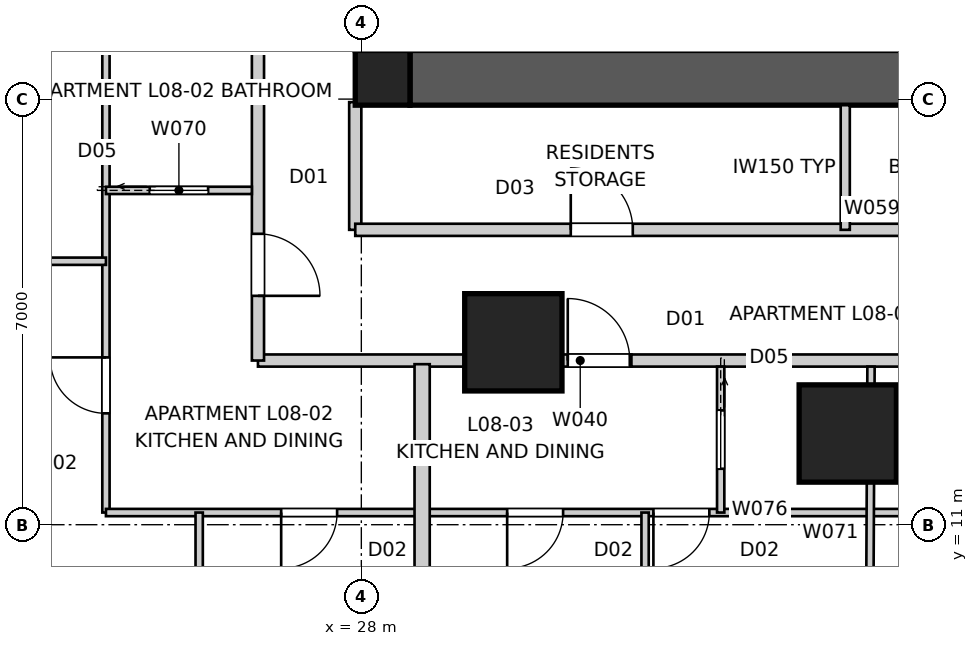
"""IFC4 building model, lengths in metres.
Left out: names, types, materials, properties, quantities, classifications, styles, units other than length and angle.
Written with IfcOpenShell. Run it as: python <this file> out.ifc"""

import sys

from ifc_helpers import new_model, si_unit, direction, frame, frame_2d, origin, origin_2d, place, context, subcontext, project, spatial, polyline, rectangle, outline, extrude, element, fill, save


model = new_model("IFC4")
c1 = context("Model", 3, precision=1e-05, world=origin(), true_north=direction((0.0, 1.0)))
c2 = subcontext(c1, "Body", "Model", "MODEL_VIEW")
j1 = project(units=[si_unit("LENGTHUNIT", "METRE"), si_unit("PLANEANGLEUNIT", "RADIAN")], contexts=[c1])
p1 = place(None, origin())
s1 = spatial("IfcSite", under=j1, at=p1, CompositionType="ELEMENT")
p2 = place(p1, origin())
s2 = spatial("IfcBuilding", under=s1, at=p2, CompositionType="ELEMENT")
p3 = place(p2, frame((0.0, 0.0, 32.0)))
s3 = spatial("IfcBuildingStorey", under=s2, at=p3, CompositionType="ELEMENT", Elevation=32.0)
p4 = place(p3, frame((51.2, 18.35, 0.0), z_axis=(0.0, 0.0, 1.0), x_axis=(-1.0, 0.0, 0.0)))
e1 = element("IfcWall", 1, at=p4, inside=s3, PredefinedType="SHEAR", context=c2, shape_type="SweptSolid", body=[
    extrude(outline(polyline([(0.0, -0.45), (22.4, -0.45), (22.4, -0.025), (22.85, -0.025), (22.85, 0.025), (22.4, 0.025), (22.4, 0.45), (0.0, 0.45), (0.0, 0.025), (-0.45, 0.025), (-0.45, -0.025), (0.0, -0.025), (0.0, -0.45)])), origin(), (0.0, 0.0, 1.0), 3.4),
])
p5 = place(p3, frame((28.35, 41.2, 0.0), z_axis=(0.0, 0.0, 1.0), x_axis=(0.0, -1.0, 0.0)))
e2 = element("IfcWall", 2, at=p5, inside=s3, PredefinedType="SHEAR", context=c2, shape_type="SweptSolid", body=[
    extrude(outline(polyline([(0.0, -0.45), (22.4, -0.45), (22.4, -0.025), (22.85, -0.025), (22.85, 0.025), (22.4, 0.025), (22.4, 0.45), (0.0, 0.45), (0.0, 0.025), (-0.45, 0.025), (-0.45, -0.025), (0.0, -0.025), (0.0, -0.45)])), origin(), (0.0, 0.0, 1.0), 3.4),
])
p6 = place(p5, frame((11.14, 0.0, 0.0)))
e3 = element("IfcOpeningElement", 3, at=p6, cuts=e2, PredefinedType="OPENING", context=c2, shape_type="SweptSolid", body=[
    extrude(rectangle(XDim=1.02, YDim=2.4, at=frame_2d((0.51, 1.2))), frame((0.0, 0.46, 0.0), z_axis=(0.0, -1.0, 0.0), x_axis=(1.0, 0.0, 0.0)), (0.0, 0.0, 1.0), 0.92),
])
p7 = place(p3, frame((28.35, 18.35, 0.0), z_axis=(0.0, 0.0, 1.0), x_axis=(1.0, 0.0, 0.0)))
e4 = element("IfcColumn", 4, at=p7, inside=s3, PredefinedType="COLUMN", context=c2, shape_type="SweptSolid", body=[
    extrude(rectangle(XDim=0.9, YDim=0.9, at=origin_2d()), origin(), (0.0, 0.0, 1.0), 3.4),
])
for number, where, z_axis, x_axis in (
    (5, (30.5, 14.0, 0.0), (0.0, 0.0, 1.0), (1.0, 0.0, 0.0)),
    (6, (36.0, 12.5, 0.0), (0.0, 0.0, 1.0), (1.0, 0.0, 0.0)),
):
    element("IfcColumn", number, at=place(p3, frame(where, z_axis=z_axis, x_axis=x_axis)), inside=s3, PredefinedType="COLUMN", context=c2, shape_type="SweptSolid", body=[
        extrude(rectangle(XDim=1.6, YDim=1.6, at=origin_2d()), origin(), (0.0, 0.0, 1.0), 3.4),
    ])
p8 = place(p3, frame((26.3, 13.7, 0.0), z_axis=(0.0, 0.0, 1.0), x_axis=(1.0, 0.0, 0.0)))
e7 = element("IfcWall", 7, at=p8, inside=s3, PredefinedType="PARTITIONING", context=c2, shape_type="SweptSolid", body=[
    extrude(rectangle(XDim=4.458, YDim=0.2, at=frame_2d((2.229, 0.0))), origin(), (0.0, 0.0, 1.0), 3.25),
])
p9 = place(p3, frame((30.758, 13.7, 0.0), z_axis=(0.0, 0.0, 1.0), x_axis=(1.0, 0.0, 0.0)))
e8 = element("IfcWall", 8, at=p9, inside=s3, PredefinedType="PARTITIONING", context=c2, shape_type="SweptSolid", body=[
    extrude(rectangle(XDim=1.683, YDim=0.2, at=frame_2d((0.842, 0.0))), origin(), (0.0, 0.0, 1.0), 2.55),
])
p10 = place(p9, frame((0.637, 0.0, 0.0)))
e9 = element("IfcOpeningElement", 9, at=p10, cuts=e8, PredefinedType="OPENING", context=c2, shape_type="SweptSolid", body=[
    extrude(rectangle(XDim=1.02, YDim=2.34, at=frame_2d((0.51, 1.17))), frame((0.0, 0.11, 0.0), z_axis=(0.0, -1.0, 0.0), x_axis=(1.0, 0.0, 0.0)), (0.0, 0.0, 1.0), 0.22),
])
p11 = place(p3, frame((32.442, 13.7, 0.0), z_axis=(0.0, 0.0, 1.0), x_axis=(1.0, 0.0, 0.0)))
e10 = element("IfcWall", 10, at=p11, inside=s3, PredefinedType="PARTITIONING", context=c2, shape_type="SweptSolid", body=[
    extrude(rectangle(XDim=15.117, YDim=0.2, at=frame_2d((7.558, 0.0))), origin(), (0.0, 0.0, 1.0), 3.25),
])
p12 = place(p3, frame((26.3, 46.3, 0.0), z_axis=(0.0, 0.0, 1.0), x_axis=(0.0, -1.0, 0.0)))
e11 = element("IfcWall", 11, at=p12, inside=s3, PredefinedType="PARTITIONING", context=c2, shape_type="SweptSolid", body=[
    extrude(rectangle(XDim=32.6, YDim=0.2, at=frame_2d((16.3, 0.0))), origin(), (0.0, 0.0, 1.0), 3.25),
])
p13 = place(p12, frame((2.315, 0.0, 0.0)))
e12 = element("IfcOpeningElement", 12, at=p13, cuts=e11, PredefinedType="OPENING", context=c2, shape_type="SweptSolid", body=[
    extrude(rectangle(XDim=1.02, YDim=2.34, at=frame_2d((0.51, 1.17))), frame((0.0, 0.11, 0.0), z_axis=(0.0, -1.0, 0.0), x_axis=(1.0, 0.0, 0.0)), (0.0, 0.0, 1.0), 0.22),
])
p14 = place(p12, frame((10.624, 0.0, 0.0)))
e13 = element("IfcOpeningElement", 13, at=p14, cuts=e11, PredefinedType="OPENING", context=c2, shape_type="SweptSolid", body=[
    extrude(rectangle(XDim=1.02, YDim=2.34, at=frame_2d((0.51, 1.17))), frame((0.0, 0.11, 0.0), z_axis=(0.0, -1.0, 0.0), x_axis=(1.0, 0.0, 0.0)), (0.0, 0.0, 1.0), 0.22),
])
p15 = place(p12, frame((17.848, 0.0, 0.0)))
e14 = element("IfcOpeningElement", 14, at=p15, cuts=e11, PredefinedType="OPENING", context=c2, shape_type="SweptSolid", body=[
    extrude(rectangle(XDim=1.02, YDim=2.34, at=frame_2d((0.51, 1.17))), frame((0.0, 0.11, 0.0), z_axis=(0.0, -1.0, 0.0), x_axis=(1.0, 0.0, 0.0)), (0.0, 0.0, 1.0), 0.22),
])
p16 = place(p12, frame((30.516, 0.0, 0.0)))
e15 = element("IfcOpeningElement", 15, at=p16, cuts=e11, PredefinedType="OPENING", context=c2, shape_type="SweptSolid", body=[
    extrude(rectangle(XDim=1.02, YDim=2.34, at=frame_2d((0.51, 1.17))), frame((0.0, 0.11, 0.0), z_axis=(0.0, -1.0, 0.0), x_axis=(1.0, 0.0, 0.0)), (0.0, 0.0, 1.0), 0.22),
])
p17 = place(p3, frame((29.0, 4.0, 0.0), z_axis=(0.0, 0.0, 1.0), x_axis=(0.0, 1.0, 0.0)))
e16 = element("IfcWall", 16, at=p17, inside=s3, PredefinedType="PARTITIONING", context=c2, shape_type="SweptSolid", body=[
    extrude(rectangle(XDim=9.64, YDim=0.25, at=frame_2d((4.82, 0.0))), origin(), (0.0, 0.0, 1.0), 3.25),
])
p18 = place(p3, frame((27.9, 17.95, 0.0), z_axis=(0.0, 0.0, 1.0), x_axis=(0.0, -1.0, 0.0)))
e17 = element("IfcWall", 17, at=p18, inside=s3, PredefinedType="PARTITIONING", context=c2, shape_type="SweptSolid", body=[
    extrude(rectangle(XDim=2.1, YDim=0.2, at=frame_2d((1.05, 0.0))), origin(), (0.0, 0.0, 1.0), 3.25),
])
p19 = place(p3, frame((27.9, 15.85, 0.0), z_axis=(0.0, 0.0, 1.0), x_axis=(1.0, 0.0, 0.0)))
e18 = element("IfcWall", 18, at=p19, inside=s3, PredefinedType="PARTITIONING", context=c2, shape_type="SweptSolid", body=[
    extrude(rectangle(XDim=24.2, YDim=0.2, at=frame_2d((12.1, 0.0))), origin(), (0.0, 0.0, 1.0), 3.25),
])
p20 = place(p19, frame((12.437, 0.0, 0.0)))
e19 = element("IfcOpeningElement", 19, at=p20, cuts=e18, PredefinedType="OPENING", context=c2, shape_type="SweptSolid", body=[
    extrude(rectangle(XDim=1.02, YDim=2.1, at=frame_2d((0.51, 1.05))), frame((0.0, 0.11, 0.0), z_axis=(0.0, -1.0, 0.0), x_axis=(1.0, 0.0, 0.0)), (0.0, 0.0, 1.0), 0.22),
])
p21 = place(p19, frame((3.544, 0.0, 0.0)))
e20 = element("IfcOpeningElement", 20, at=p21, cuts=e18, PredefinedType="OPENING", context=c2, shape_type="SweptSolid", body=[
    extrude(rectangle(XDim=1.02, YDim=2.1, at=frame_2d((0.51, 1.05))), frame((0.0, 0.11, 0.0), z_axis=(0.0, -1.0, 0.0), x_axis=(1.0, 0.0, 0.0)), (0.0, 0.0, 1.0), 0.22),
])
p22 = place(p19, frame((19.733, 0.0, 0.0)))
e21 = element("IfcOpeningElement", 21, at=p22, cuts=e18, PredefinedType="OPENING", context=c2, shape_type="SweptSolid", body=[
    extrude(rectangle(XDim=1.02, YDim=2.1, at=frame_2d((0.51, 1.05))), frame((0.0, 0.11, 0.0), z_axis=(0.0, -1.0, 0.0), x_axis=(1.0, 0.0, 0.0)), (0.0, 0.0, 1.0), 0.22),
])
p23 = place(p3, frame((35.958, 15.85, 0.0), z_axis=(0.0, 0.0, 1.0), x_axis=(0.0, 1.0, 0.0)))
e22 = element("IfcWall", 22, at=p23, inside=s3, PredefinedType="SOLIDWALL", context=c2, shape_type="SweptSolid", body=[
    extrude(rectangle(XDim=2.05, YDim=0.15, at=frame_2d((1.025, 0.0))), origin(), (0.0, 0.0, 1.0), 3.25),
])
p24 = place(p3, frame((23.8, 11.2, 0.0), z_axis=(0.0, 0.0, 1.0), x_axis=(0.0, 1.0, 0.0)))
e23 = element("IfcWall", 23, at=p24, inside=s3, PredefinedType="PARTITIONING", context=c2, shape_type="SweptSolid", body=[
    extrude(rectangle(XDim=37.133, YDim=0.12, at=frame_2d((18.567, 0.0))), origin(), (0.0, 0.0, 1.0), 2.55),
])
p25 = place(p24, frame((33.007, 0.0, 0.0)))
e24 = element("IfcOpeningElement", 24, at=p25, cuts=e23, PredefinedType="OPENING", context=c2, shape_type="SweptSolid", body=[
    extrude(rectangle(XDim=0.92, YDim=2.34, at=frame_2d((0.46, 1.17))), frame((0.0, 0.07, 0.0), z_axis=(0.0, -1.0, 0.0), x_axis=(1.0, 0.0, 0.0)), (0.0, 0.0, 1.0), 0.14),
])
p26 = place(p24, frame((23.84, 0.0, 0.0)))
e25 = element("IfcOpeningElement", 25, at=p26, cuts=e23, PredefinedType="OPENING", context=c2, shape_type="SweptSolid", body=[
    extrude(rectangle(XDim=0.92, YDim=2.34, at=frame_2d((0.46, 1.17))), frame((0.0, 0.07, 0.0), z_axis=(0.0, -1.0, 0.0), x_axis=(1.0, 0.0, 0.0)), (0.0, 0.0, 1.0), 0.14),
])
p27 = place(p24, frame((16.482, 0.0, 0.0)))
e26 = element("IfcOpeningElement", 26, at=p27, cuts=e23, PredefinedType="OPENING", context=c2, shape_type="SweptSolid", body=[
    extrude(rectangle(XDim=0.92, YDim=2.34, at=frame_2d((0.46, 1.17))), frame((0.0, 0.07, 0.0), z_axis=(0.0, -1.0, 0.0), x_axis=(1.0, 0.0, 0.0)), (0.0, 0.0, 1.0), 0.14),
])
p28 = place(p24, frame((1.632, 0.0, 0.0)))
e27 = element("IfcOpeningElement", 27, at=p28, cuts=e23, PredefinedType="OPENING", context=c2, shape_type="SweptSolid", body=[
    extrude(rectangle(XDim=0.92, YDim=2.34, at=frame_2d((0.46, 1.17))), frame((0.0, 0.07, 0.0), z_axis=(0.0, -1.0, 0.0), x_axis=(1.0, 0.0, 0.0)), (0.0, 0.0, 1.0), 0.14),
])
p29 = place(p24, frame((19.704, 0.0, 0.0)))
e28 = element("IfcOpeningElement", 28, at=p29, cuts=e23, PredefinedType="OPENING", context=c2, shape_type="SweptSolid", body=[
    extrude(rectangle(XDim=0.96, YDim=2.1, at=frame_2d((0.48, 1.05))), frame((0.0, 0.07, 0.0), z_axis=(0.0, -1.0, 0.0), x_axis=(1.0, 0.0, 0.0)), (0.0, 0.0, 1.0), 0.14),
])
p30 = place(p24, frame((10.128, 0.0, 0.0)))
e29 = element("IfcOpeningElement", 29, at=p30, cuts=e23, PredefinedType="OPENING", context=c2, shape_type="SweptSolid", body=[
    extrude(rectangle(XDim=0.96, YDim=2.1, at=frame_2d((0.48, 1.05))), frame((0.0, 0.07, 0.0), z_axis=(0.0, -1.0, 0.0), x_axis=(1.0, 0.0, 0.0)), (0.0, 0.0, 1.0), 0.14),
])
p31 = place(p3, frame((23.8, 16.499, 0.0), z_axis=(0.0, 0.0, 1.0), x_axis=(1.0, 0.0, 0.0)))
e30 = element("IfcWall", 30, at=p31, inside=s3, PredefinedType="PARTITIONING", context=c2, shape_type="SweptSolid", body=[
    extrude(rectangle(XDim=2.4, YDim=0.12, at=frame_2d((1.2, 0.0))), origin(), (0.0, 0.0, 1.0), 3.25),
])
p32 = place(p31, frame((0.72, 0.0, 0.0)))
e31 = element("IfcOpeningElement", 31, at=p32, cuts=e30, PredefinedType="OPENING", context=c2, shape_type="SweptSolid", body=[
    extrude(rectangle(XDim=0.96, YDim=2.1, at=frame_2d((0.48, 1.05))), frame((0.0, 0.07, 0.0), z_axis=(0.0, -1.0, 0.0), x_axis=(1.0, 0.0, 0.0)), (0.0, 0.0, 1.0), 0.14),
])
p33 = place(p3, frame((54.667, 11.2, 0.0), z_axis=(0.0, 0.0, 1.0), x_axis=(-1.0, 0.0, 0.0)))
e32 = element("IfcWall", 32, at=p33, inside=s3, PredefinedType="PARTITIONING", context=c2, shape_type="SweptSolid", body=[
    extrude(rectangle(XDim=30.867, YDim=0.12, at=frame_2d((15.433, 0.0))), origin(), (0.0, 0.0, 1.0), 3.25),
])
p34 = place(p33, frame((23.348, 0.0, 0.0)))
e33 = element("IfcOpeningElement", 33, at=p34, cuts=e32, PredefinedType="OPENING", context=c2, shape_type="SweptSolid", body=[
    extrude(rectangle(XDim=0.92, YDim=2.34, at=frame_2d((0.46, 1.17))), frame((0.0, 0.07, 0.0), z_axis=(0.0, -1.0, 0.0), x_axis=(1.0, 0.0, 0.0)), (0.0, 0.0, 1.0), 0.14),
])
p35 = place(p33, frame((20.943, 0.0, 0.0)))
e34 = element("IfcOpeningElement", 34, at=p35, cuts=e32, PredefinedType="OPENING", context=c2, shape_type="SweptSolid", body=[
    extrude(rectangle(XDim=0.92, YDim=2.34, at=frame_2d((0.46, 1.17))), frame((0.0, 0.07, 0.0), z_axis=(0.0, -1.0, 0.0), x_axis=(1.0, 0.0, 0.0)), (0.0, 0.0, 1.0), 0.14),
])
p36 = place(p33, frame((5.065, 0.0, 0.0)))
e35 = element("IfcOpeningElement", 35, at=p36, cuts=e32, PredefinedType="OPENING", context=c2, shape_type="SweptSolid", body=[
    extrude(rectangle(XDim=0.92, YDim=2.34, at=frame_2d((0.46, 1.17))), frame((0.0, 0.07, 0.0), z_axis=(0.0, -1.0, 0.0), x_axis=(1.0, 0.0, 0.0)), (0.0, 0.0, 1.0), 0.14),
])
p37 = place(p33, frame((27.065, 0.0, 0.0)))
e36 = element("IfcOpeningElement", 36, at=p37, cuts=e32, PredefinedType="OPENING", context=c2, shape_type="SweptSolid", body=[
    extrude(rectangle(XDim=0.92, YDim=2.34, at=frame_2d((0.46, 1.17))), frame((0.0, 0.07, 0.0), z_axis=(0.0, -1.0, 0.0), x_axis=(1.0, 0.0, 0.0)), (0.0, 0.0, 1.0), 0.14),
])
p38 = place(p33, frame((1.353, 0.0, 0.0)))
e37 = element("IfcOpeningElement", 37, at=p38, cuts=e32, PredefinedType="OPENING", context=c2, shape_type="SweptSolid", body=[
    extrude(rectangle(XDim=0.96, YDim=2.1, at=frame_2d((0.48, 1.05))), frame((0.0, 0.07, 0.0), z_axis=(0.0, -1.0, 0.0), x_axis=(1.0, 0.0, 0.0)), (0.0, 0.0, 1.0), 0.14),
])
p39 = place(p33, frame((8.83, 0.0, 0.0)))
e38 = element("IfcOpeningElement", 38, at=p39, cuts=e32, PredefinedType="OPENING", context=c2, shape_type="SweptSolid", body=[
    extrude(rectangle(XDim=0.96, YDim=2.1, at=frame_2d((0.48, 1.05))), frame((0.0, 0.07, 0.0), z_axis=(0.0, -1.0, 0.0), x_axis=(1.0, 0.0, 0.0)), (0.0, 0.0, 1.0), 0.14),
])
p40 = place(p33, frame((12.328, 0.0, 0.0)))
e39 = element("IfcOpeningElement", 39, at=p40, cuts=e32, PredefinedType="OPENING", context=c2, shape_type="SweptSolid", body=[
    extrude(rectangle(XDim=0.96, YDim=2.1, at=frame_2d((0.48, 1.05))), frame((0.0, 0.07, 0.0), z_axis=(0.0, -1.0, 0.0), x_axis=(1.0, 0.0, 0.0)), (0.0, 0.0, 1.0), 0.14),
])
p41 = place(p33, frame((15.996, 0.0, 0.0)))
e40 = element("IfcOpeningElement", 40, at=p41, cuts=e32, PredefinedType="OPENING", context=c2, shape_type="SweptSolid", body=[
    extrude(rectangle(XDim=0.96, YDim=2.1, at=frame_2d((0.48, 1.05))), frame((0.0, 0.07, 0.0), z_axis=(0.0, -1.0, 0.0), x_axis=(1.0, 0.0, 0.0)), (0.0, 0.0, 1.0), 0.14),
])
p42 = place(p3, frame((14.04, 15.333, 0.0), z_axis=(0.0, 0.0, 1.0), x_axis=(1.0, 0.0, 0.0)))
e41 = element("IfcWall", 41, at=p42, inside=s3, PredefinedType="PARTITIONING", context=c2, shape_type="SweptSolid", body=[
    extrude(rectangle(XDim=9.76, YDim=0.12, at=frame_2d((4.88, 0.0))), origin(), (0.0, 0.0, 1.0), 2.638),
])
p43 = place(p42, frame((7.364, 0.0, 0.0)))
e42 = element("IfcOpeningElement", 42, at=p43, cuts=e41, PredefinedType="OPENING", context=c2, shape_type="SweptSolid", body=[
    extrude(rectangle(XDim=0.92, YDim=2.34, at=frame_2d((0.46, 1.17))), frame((0.0, 0.07, 0.0), z_axis=(0.0, -1.0, 0.0), x_axis=(1.0, 0.0, 0.0)), (0.0, 0.0, 1.0), 0.14),
])
p44 = place(p3, frame((25.333, 11.2, 0.0), z_axis=(0.0, 0.0, 1.0), x_axis=(0.0, -1.0, 0.0)))
e43 = element("IfcWall", 43, at=p44, inside=s3, PredefinedType="PARTITIONING", context=c2, shape_type="SweptSolid", body=[
    extrude(rectangle(XDim=7.16, YDim=0.12, at=frame_2d((3.58, 0.0))), origin(), (0.0, 0.0, 1.0), 2.638),
])
p45 = place(p3, frame((33.91, 13.6, 0.0), z_axis=(0.0, 0.0, 1.0), x_axis=(0.0, -1.0, 0.0)))
e44 = element("IfcWall", 44, at=p45, inside=s3, PredefinedType="PARTITIONING", context=c2, shape_type="SweptSolid", body=[
    extrude(rectangle(XDim=2.4, YDim=0.12, at=frame_2d((1.2, 0.0))), origin(), (0.0, 0.0, 1.0), 3.25),
])
p46 = place(p45, frame((0.72, 0.0, 0.0)))
e45 = element("IfcOpeningElement", 45, at=p46, cuts=e44, PredefinedType="OPENING", context=c2, shape_type="SweptSolid", body=[
    extrude(rectangle(XDim=0.96, YDim=2.1, at=frame_2d((0.48, 1.05))), frame((0.0, 0.07, 0.0), z_axis=(0.0, -1.0, 0.0), x_axis=(1.0, 0.0, 0.0)), (0.0, 0.0, 1.0), 0.14),
])
p47 = place(p3, frame((36.333, 4.04, 0.0), z_axis=(0.0, 0.0, 1.0), x_axis=(0.005107446534, 0.99998695691, 0.0)))
e46 = element("IfcWall", 46, at=p47, inside=s3, PredefinedType="PARTITIONING", context=c2, shape_type="SweptSolid", body=[
    extrude(rectangle(XDim=9.56, YDim=0.12, at=frame_2d((4.78, 0.0))), origin(), (0.0, 0.0, 1.0), 3.25),
])
p48 = place(p47, frame((3.1, 0.0, 0.0)))
e47 = element("IfcOpeningElement", 47, at=p48, cuts=e46, PredefinedType="OPENING", context=c2, shape_type="SweptSolid", body=[
    extrude(rectangle(XDim=0.92, YDim=2.34, at=frame_2d((0.46, 1.17))), frame((0.0, 0.07, 0.0), z_axis=(0.0, -1.0, 0.0), x_axis=(1.0, 0.0, 0.0)), (0.0, 0.0, 1.0), 0.14),
])
p49 = place(p3, frame((32.667, 11.2, 0.0), z_axis=(0.0, 0.0, 1.0), x_axis=(0.0, -1.0, 0.0)))
e48 = element("IfcWall", 48, at=p49, inside=s3, PredefinedType="PARTITIONING", context=c2, shape_type="SweptSolid", body=[
    extrude(rectangle(XDim=7.16, YDim=0.12, at=frame_2d((3.58, 0.0))), origin(), (0.0, 0.0, 1.0), 3.25),
])
p50 = place(p21, origin())
e49 = element("IfcDoor", 49, at=p50, inside=s3, OperationType="SINGLE_SWING_LEFT", PredefinedType="DOOR", context=c2, shape_type="SweptSolid", body=[
    extrude(rectangle(XDim=1.02, YDim=2.1, at=frame_2d((0.51, 1.05))), frame((0.0, 0.025, 0.0), z_axis=(0.0, -1.0, 0.0), x_axis=(1.0, 0.0, 0.0)), (0.0, 0.0, 1.0), 0.05),
])
fill(e20, e49)
p51 = place(p10, origin())
e50 = element("IfcDoor", 50, at=p51, inside=s3, OperationType="SINGLE_SWING_LEFT", PredefinedType="DOOR", context=c2, shape_type="SweptSolid", body=[
    extrude(rectangle(XDim=1.02, YDim=2.34, at=frame_2d((0.51, 1.17))), frame((0.0, 0.025, 0.0), z_axis=(0.0, -1.0, 0.0), x_axis=(1.0, 0.0, 0.0)), (0.0, 0.0, 1.0), 0.05),
])
fill(e9, e50)
p52 = place(p16, origin())
e51 = element("IfcDoor", 51, at=p52, inside=s3, OperationType="SINGLE_SWING_RIGHT", PredefinedType="DOOR", context=c2, shape_type="SweptSolid", body=[
    extrude(rectangle(XDim=1.02, YDim=2.34, at=frame_2d((0.51, 1.17))), frame((0.0, 0.025, 0.0), z_axis=(0.0, -1.0, 0.0), x_axis=(1.0, 0.0, 0.0)), (0.0, 0.0, 1.0), 0.05),
])
fill(e15, e51)
p53 = place(p34, origin())
e52 = element("IfcDoor", 52, at=p53, inside=s3, OperationType="SINGLE_SWING_RIGHT", PredefinedType="DOOR", context=c2, shape_type="SweptSolid", body=[
    extrude(rectangle(XDim=0.92, YDim=2.34, at=frame_2d((0.46, 1.17))), frame((0.0, 0.025, 0.0), z_axis=(0.0, -1.0, 0.0), x_axis=(1.0, 0.0, 0.0)), (0.0, 0.0, 1.0), 0.05),
])
fill(e33, e52)
p54 = place(p46, origin())
e53 = element("IfcDoor", 53, at=p54, inside=s3, OperationType="SLIDING_TO_LEFT", PredefinedType="DOOR", context=c2, shape_type="SweptSolid", body=[
    extrude(rectangle(XDim=0.96, YDim=2.1, at=frame_2d((0.48, 1.05))), frame((0.0, 0.025, 0.0), z_axis=(0.0, -1.0, 0.0), x_axis=(1.0, 0.0, 0.0)), (0.0, 0.0, 1.0), 0.05),
])
fill(e45, e53)
p55 = place(p35, origin())
e54 = element("IfcDoor", 54, at=p55, inside=s3, OperationType="SINGLE_SWING_RIGHT", PredefinedType="DOOR", context=c2, shape_type="SweptSolid", body=[
    extrude(rectangle(XDim=0.92, YDim=2.34, at=frame_2d((0.46, 1.17))), frame((0.0, 0.025, 0.0), z_axis=(0.0, -1.0, 0.0), x_axis=(1.0, 0.0, 0.0)), (0.0, 0.0, 1.0), 0.05),
])
fill(e34, e54)
p56 = place(p28, origin())
e55 = element("IfcDoor", 55, at=p56, inside=s3, OperationType="SINGLE_SWING_RIGHT", PredefinedType="DOOR", context=c2, shape_type="SweptSolid", body=[
    extrude(rectangle(XDim=0.92, YDim=2.34, at=frame_2d((0.46, 1.17))), frame((0.0, 0.025, 0.0), z_axis=(0.0, -1.0, 0.0), x_axis=(1.0, 0.0, 0.0)), (0.0, 0.0, 1.0), 0.05),
])
fill(e27, e55)
p57 = place(p37, origin())
e56 = element("IfcDoor", 56, at=p57, inside=s3, OperationType="SINGLE_SWING_RIGHT", PredefinedType="DOOR", context=c2, shape_type="SweptSolid", body=[
    extrude(rectangle(XDim=0.92, YDim=2.34, at=frame_2d((0.46, 1.17))), frame((0.0, 0.025, 0.0), z_axis=(0.0, -1.0, 0.0), x_axis=(1.0, 0.0, 0.0)), (0.0, 0.0, 1.0), 0.05),
])
fill(e36, e56)
p58 = place(p32, origin())
e57 = element("IfcDoor", 57, at=p58, inside=s3, OperationType="SLIDING_TO_LEFT", PredefinedType="DOOR", context=c2, shape_type="SweptSolid", body=[
    extrude(rectangle(XDim=0.96, YDim=2.1, at=frame_2d((0.48, 1.05))), frame((0.0, 0.025, 0.0), z_axis=(0.0, -1.0, 0.0), x_axis=(1.0, 0.0, 0.0)), (0.0, 0.0, 1.0), 0.05),
])
fill(e31, e57)
save(model, sys.argv[1])
